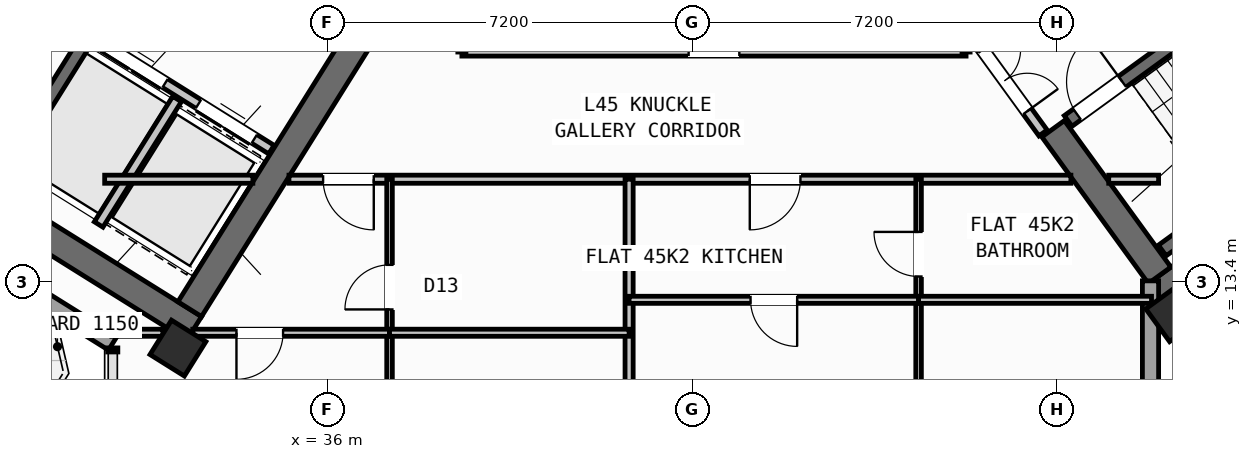
"""IFC4 building model, lengths in metres.
Left out: names, types, materials, properties, quantities, classifications, styles, units other than length and angle.
Written with IfcOpenShell. Run it as: python <this file> out.ifc"""

import sys

from ifc_helpers import new_model, si_unit, direction, frame, frame_2d, origin, origin_2d, place, context, subcontext, project, spatial, rectangle, hollow_rectangle, extrude, source, transform, mapped, element, fill, save


model = new_model("IFC4")
c1 = context("Model", 3, precision=1e-05, world=origin(), true_north=direction((0.0, 1.0)))
c2 = subcontext(c1, "Body", "Model", "MODEL_VIEW")
j1 = project(units=[si_unit("LENGTHUNIT", "METRE"), si_unit("PLANEANGLEUNIT", "RADIAN")], contexts=[c1])
p1 = place(None, origin())
s1 = spatial("IfcSite", under=j1, at=p1, CompositionType="ELEMENT")
p2 = place(p1, origin())
s2 = spatial("IfcBuilding", under=s1, at=p2, CompositionType="ELEMENT")
p3 = place(p2, frame((0.0, 0.0, 179.4)))
s3 = spatial("IfcBuildingStorey", under=s2, at=p3, CompositionType="ELEMENT", Elevation=179.4)
p4 = place(p3, frame((33.366, 12.477, 0.0), z_axis=(0.0, 0.0, 1.0), x_axis=(-0.848047359947, 0.529920442413, 0.0)))
e1 = element("IfcWall", 1, at=p4, inside=s3, PredefinedType="SHEAR", context=c2, shape_type="SweptSolid", body=[
    extrude(rectangle(XDim=13.14, YDim=0.55, at=frame_2d((6.57, 0.0))), origin(), (0.0, 0.0, 1.0), 4.55),
])
p5 = place(p3, frame((36.683, 18.304, 0.0), z_axis=(0.0, 0.0, 1.0), x_axis=(-0.529896466841, -0.848062341122, 0.0)))
e2 = element("IfcWall", 2, at=p5, inside=s3, PredefinedType="SHEAR", context=c2, shape_type="SweptSolid", body=[
    extrude(rectangle(XDim=6.425, YDim=0.55, at=frame_2d((3.212, 0.0))), origin(), (0.0, 0.0, 1.0), 4.55),
])
p6 = place(p3, frame((52.359, 13.14, 0.0), z_axis=(0.0, 0.0, 1.0), x_axis=(0.809014896919, 0.587788139183, 0.0)))
e3 = element("IfcWall", 3, at=p6, inside=s3, PredefinedType="SHEAR", context=c2, shape_type="SweptSolid", body=[
    extrude(rectangle(XDim=12.34, YDim=0.55, at=frame_2d((6.17, 0.0))), origin(), (0.0, 0.0, 1.0), 4.55),
])
p7 = place(p3, frame((52.42, 13.524, 0.0), z_axis=(0.0, 0.0, 1.0), x_axis=(-0.587802113096, 0.809004744015, 0.0)))
e4 = element("IfcWall", 4, at=p7, inside=s3, PredefinedType="SHEAR", context=c2, shape_type="SweptSolid", body=[
    extrude(rectangle(XDim=3.575, YDim=0.55, at=frame_2d((1.788, 0.0))), origin(), (0.0, 0.0, 1.0), 4.55),
])
m1 = source(origin(), c2, "Body", "SweptSolid", [
    extrude(hollow_rectangle(XDim=0.8, YDim=0.8, WallThickness=0.032, at=origin_2d()), origin(), (0.0, 0.0, 1.0), 4.8),
])
for number, where, z_axis, x_axis in (
    (5, (33.046, 12.087, 0.0), (0.0, 0.0, 1.0), (-0.848, 0.53, 0.0)),
    (6, (52.705, 12.773, 0.0), (0.0, 0.0, 1.0), (0.809, 0.588, 0.0)),
):
    element("IfcColumn", number, at=place(p3, frame(where, z_axis=z_axis, x_axis=x_axis)), inside=s3, PredefinedType="COLUMN", context=c2, shape_type="MappedRepresentation", body=[
        mapped(m1, transform((0.0, 0.0, 0.0), scale=1.0)),
    ])
p8 = place(p3, frame((31.76, 12.183, 0.0), z_axis=(0.0, 0.0, 1.0), x_axis=(-0.848047074256, 0.529920899612, 0.0)))
e7 = element("IfcWall", 7, at=p8, inside=s3, PredefinedType="STANDARD", context=c2, shape_type="SweptSolid", body=[
    extrude(rectangle(XDim=30.652, YDim=0.32, at=frame_2d((15.326, 0.0))), origin(), (0.0, 0.0, 1.0), 4.55),
])
p9 = place(p8, frame((21.52, 0.0, 0.0)))
e8 = element("IfcOpeningElement", 8, at=p9, cuts=e7, PredefinedType="OPENING", context=c2, shape_type="SweptSolid", body=[
    extrude(rectangle(XDim=1.2, YDim=2.15, at=frame_2d((0.6, 1.075))), frame((0.0, 0.17, 0.0), z_axis=(0.0, -1.0, 0.0), x_axis=(1.0, 0.0, 0.0)), (0.0, 0.0, 1.0), 0.34),
])
p10 = place(p8, frame((14.878, 0.0, 0.0)))
e9 = element("IfcOpeningElement", 9, at=p10, cuts=e7, PredefinedType="OPENING", context=c2, shape_type="SweptSolid", body=[
    extrude(rectangle(XDim=1.5, YDim=2.25, at=frame_2d((0.75, 1.125))), frame((0.0, 0.17, 0.0), z_axis=(0.0, -1.0, 0.0), x_axis=(1.0, 0.0, 0.0)), (0.0, 0.0, 1.0), 0.34),
])
p11 = place(p8, frame((1.865, 0.0, 0.75)))
e10 = element("IfcOpeningElement", 10, at=p11, cuts=e7, PredefinedType="OPENING", context=c2, shape_type="SweptSolid", body=[
    extrude(rectangle(XDim=2.4, YDim=1.6, at=frame_2d((1.2, 0.8))), frame((0.0, 0.17, 0.0), z_axis=(0.0, -1.0, 0.0), x_axis=(1.0, 0.0, 0.0)), (0.0, 0.0, 1.0), 0.34),
])
p12 = place(p8, frame((7.094, 0.0, 0.75)))
e11 = element("IfcOpeningElement", 11, at=p12, cuts=e7, PredefinedType="OPENING", context=c2, shape_type="SweptSolid", body=[
    extrude(rectangle(XDim=2.4, YDim=1.6, at=frame_2d((1.2, 0.8))), frame((0.0, 0.17, 0.0), z_axis=(0.0, -1.0, 0.0), x_axis=(1.0, 0.0, 0.0)), (0.0, 0.0, 1.0), 0.34),
])
p13 = place(p8, frame((19.404, 0.0, 0.95)))
e12 = element("IfcOpeningElement", 12, at=p13, cuts=e7, PredefinedType="OPENING", context=c2, shape_type="SweptSolid", body=[
    extrude(rectangle(XDim=1.2, YDim=1.4, at=frame_2d((0.6, 0.7))), frame((0.0, 0.17, 0.0), z_axis=(0.0, -1.0, 0.0), x_axis=(1.0, 0.0, 0.0)), (0.0, 0.0, 1.0), 0.34),
])
p14 = place(p8, frame((26.458, 0.0, 0.75)))
e13 = element("IfcOpeningElement", 13, at=p14, cuts=e7, PredefinedType="OPENING", context=c2, shape_type="SweptSolid", body=[
    extrude(rectangle(XDim=2.4, YDim=1.6, at=frame_2d((1.2, 0.8))), frame((0.0, 0.17, 0.0), z_axis=(0.0, -1.0, 0.0), x_axis=(1.0, 0.0, 0.0)), (0.0, 0.0, 1.0), 0.34),
])
p15 = place(p3, frame((52.24, 13.414, 0.0), z_axis=(0.0, 0.0, 1.0), x_axis=(0.0, -1.0, 0.0)))
e14 = element("IfcWall", 14, at=p15, inside=s3, PredefinedType="STANDARD", context=c2, shape_type="SweptSolid", body=[
    extrude(rectangle(XDim=9.948, YDim=0.32, at=frame_2d((4.974, 0.0))), origin(), (0.0, 0.0, 1.0), 4.55),
])
p16 = place(p15, frame((2.268, 0.0, 0.75)))
e15 = element("IfcOpeningElement", 15, at=p16, cuts=e14, PredefinedType="OPENING", context=c2, shape_type="SweptSolid", body=[
    extrude(rectangle(XDim=2.4, YDim=1.6, at=frame_2d((1.2, 0.8))), frame((0.0, 0.17, 0.0), z_axis=(0.0, -1.0, 0.0), x_axis=(1.0, 0.0, 0.0)), (0.0, 0.0, 1.0), 0.34),
])
p17 = place(p15, frame((7.183, 0.0, 0.85)))
e16 = element("IfcOpeningElement", 16, at=p17, cuts=e14, PredefinedType="OPENING", context=c2, shape_type="SweptSolid", body=[
    extrude(rectangle(XDim=1.8, YDim=1.5, at=frame_2d((0.9, 0.75))), frame((0.0, 0.17, 0.0), z_axis=(0.0, -1.0, 0.0), x_axis=(1.0, 0.0, 0.0)), (0.0, 0.0, 1.0), 0.34),
])
p18 = place(p3, frame((31.288, 18.256, 0.0), z_axis=(0.0, 0.0, 1.0), x_axis=(-0.529943379326, -0.848033026897, 0.0)))
e17 = element("IfcWall", 17, at=p18, inside=s3, PredefinedType="SHEAR", context=c2, shape_type="SweptSolid", body=[
    extrude(rectangle(XDim=3.16, YDim=0.26, at=frame_2d((1.58, 0.0))), origin(), (0.0, 0.0, 1.0), 4.55),
])
p19 = place(p3, frame((34.891, 16.005, 0.0), z_axis=(0.0, 0.0, 1.0), x_axis=(-0.848062873452, 0.529895614884, 0.0)))
e18 = element("IfcWall", 18, at=p19, inside=s3, PredefinedType="STANDARD", context=c2, shape_type="SweptSolid", body=[
    extrude(rectangle(XDim=4.248, YDim=0.2, at=frame_2d((2.124, 0.0))), origin(), (0.0, 0.0, 1.0), 4.54),
])
p20 = place(p19, frame((0.398, 0.0, 0.0)))
e19 = element("IfcOpeningElement", 19, at=p20, cuts=e18, PredefinedType="OPENING", context=c2, shape_type="SweptSolid", body=[
    extrude(rectangle(XDim=1.3, YDim=2.2, at=frame_2d((0.65, 1.1))), frame((0.0, 0.11, 0.0), z_axis=(0.0, -1.0, 0.0), x_axis=(1.0, 0.0, 0.0)), (0.0, 0.0, 1.0), 0.22),
])
p21 = place(p19, frame((2.473, 0.0, 0.0)))
e20 = element("IfcOpeningElement", 20, at=p21, cuts=e18, PredefinedType="OPENING", context=c2, shape_type="SweptSolid", body=[
    extrude(rectangle(XDim=1.45, YDim=2.25, at=frame_2d((0.725, 1.125))), frame((0.0, 0.11, 0.0), z_axis=(0.0, -1.0, 0.0), x_axis=(1.0, 0.0, 0.0)), (0.0, 0.0, 1.0), 0.22),
])
p22 = place(p3, frame((33.029, 17.003, 0.0), z_axis=(0.0, 0.0, 1.0), x_axis=(-0.529916267533, -0.848049968695, 0.0)))
e21 = element("IfcWall", 21, at=p22, inside=s3, PredefinedType="STANDARD", context=c2, shape_type="SweptSolid", body=[
    extrude(rectangle(XDim=2.92, YDim=0.2, at=frame_2d((1.46, 0.0))), origin(), (0.0, 0.0, 1.0), 4.54),
])
p23 = place(p3, frame((52.472, 14.013, 0.0), z_axis=(0.0, 0.0, 1.0), x_axis=(0.809028366311, 0.587769599847, 0.0)))
e22 = element("IfcWall", 22, at=p23, inside=s3, PredefinedType="SHEAR", context=c2, shape_type="SweptSolid", body=[
    extrude(rectangle(XDim=7.33, YDim=0.26, at=frame_2d((3.665, 0.0))), origin(), (0.0, 0.0, 1.0), 4.55),
])
p24 = place(p3, frame((50.615, 16.57, 0.0), z_axis=(0.0, 0.0, 1.0), x_axis=(0.809028366311, 0.587769599847, 0.0)))
e23 = element("IfcWall", 23, at=p24, inside=s3, PredefinedType="SHEAR", context=c2, shape_type="SweptSolid", body=[
    extrude(rectangle(XDim=7.33, YDim=0.26, at=frame_2d((3.665, 0.0))), origin(), (0.0, 0.0, 1.0), 4.55),
])
p25 = place(p24, frame((0.22, 0.0, 0.0)))
e24 = element("IfcOpeningElement", 24, at=p25, cuts=e23, PredefinedType="OPENING", context=c2, shape_type="SweptSolid", body=[
    extrude(rectangle(XDim=1.1, YDim=2.1, at=frame_2d((0.55, 1.05))), frame((0.0, 0.14, 0.0), z_axis=(0.0, -1.0, 0.0), x_axis=(1.0, 0.0, 0.0)), (0.0, 0.0, 1.0), 0.28),
])
p26 = place(p3, frame((31.6, 15.42, 0.0), z_axis=(0.0, 0.0, 1.0), x_axis=(1.0, 0.0, 0.0)))
e25 = element("IfcWall", 25, at=p26, inside=s3, PredefinedType="PARTITIONING", context=c2, shape_type="SweptSolid", body=[
    extrude(rectangle(XDim=2.925, YDim=0.16, at=frame_2d((1.462, 0.0))), origin(), (0.0, 0.0, 1.0), 4.54),
])
p27 = place(p3, frame((35.237, 15.42, 0.0), z_axis=(0.0, 0.0, 1.0), x_axis=(1.0, 0.0, 0.0)))
e26 = element("IfcWall", 26, at=p27, inside=s3, PredefinedType="PARTITIONING", context=c2, shape_type="SweptSolid", body=[
    extrude(rectangle(XDim=15.432, YDim=0.16, at=frame_2d((7.716, 0.0))), origin(), (0.0, 0.0, 1.0), 4.54),
])
p28 = place(p27, frame((0.674, 0.0, 0.0)))
e27 = element("IfcOpeningElement", 27, at=p28, cuts=e26, PredefinedType="OPENING", context=c2, shape_type="SweptSolid", body=[
    extrude(rectangle(XDim=1.0, YDim=2.1, at=frame_2d((0.5, 1.05))), frame((0.0, 0.09, 0.0), z_axis=(0.0, -1.0, 0.0), x_axis=(1.0, 0.0, 0.0)), (0.0, 0.0, 1.0), 0.18),
])
p29 = place(p27, frame((9.094, 0.0, 0.0)))
e28 = element("IfcOpeningElement", 28, at=p29, cuts=e26, PredefinedType="OPENING", context=c2, shape_type="SweptSolid", body=[
    extrude(rectangle(XDim=1.0, YDim=2.1, at=frame_2d((0.5, 1.05))), frame((0.0, 0.09, 0.0), z_axis=(0.0, -1.0, 0.0), x_axis=(1.0, 0.0, 0.0)), (0.0, 0.0, 1.0), 0.18),
])
p30 = place(p3, frame((51.416, 15.42, 0.0), z_axis=(0.0, 0.0, 1.0), x_axis=(1.0, 0.0, 0.0)))
e29 = element("IfcWall", 29, at=p30, inside=s3, PredefinedType="PARTITIONING", context=c2, shape_type="SweptSolid", body=[
    extrude(rectangle(XDim=0.984, YDim=0.16, at=frame_2d((0.492, 0.0))), origin(), (0.0, 0.0, 1.0), 4.54),
])
p31 = place(p3, frame((38.65, 17.93, 0.0), z_axis=(0.0, 0.0, 1.0), x_axis=(1.0, 0.0, 0.0)))
e30 = element("IfcWall", 30, at=p31, inside=s3, PredefinedType="PARTITIONING", context=c2, shape_type="SweptSolid", body=[
    extrude(rectangle(XDim=9.95, YDim=0.16, at=frame_2d((4.975, 0.0))), origin(), (0.0, 0.0, 1.0), 4.54),
])
p32 = place(p31, frame((4.475, 0.0, 0.0)))
e31 = element("IfcOpeningElement", 31, at=p32, cuts=e30, PredefinedType="OPENING", context=c2, shape_type="SweptSolid", body=[
    extrude(rectangle(XDim=1.0, YDim=2.1, at=frame_2d((0.5, 1.05))), frame((0.0, 0.09, 0.0), z_axis=(0.0, -1.0, 0.0), x_axis=(1.0, 0.0, 0.0)), (0.0, 0.0, 1.0), 0.18),
])
p33 = place(p3, frame((50.119, 16.333, 0.0), z_axis=(0.0, 0.0, 1.0), x_axis=(-0.587749856981, 0.809042709391, 0.0)))
e32 = element("IfcWall", 32, at=p33, inside=s3, PredefinedType="STANDARD", context=c2, shape_type="SweptSolid", body=[
    extrude(rectangle(XDim=2.96, YDim=0.2, at=frame_2d((1.48, 0.0))), origin(), (0.0, 0.0, 1.0), 4.54),
])
p34 = place(p33, frame((0.53, 0.0, 0.0)))
e33 = element("IfcOpeningElement", 33, at=p34, cuts=e32, PredefinedType="OPENING", context=c2, shape_type="SweptSolid", body=[
    extrude(rectangle(XDim=1.5, YDim=2.15, at=frame_2d((0.75, 1.075))), frame((0.0, 0.11, 0.0), z_axis=(0.0, -1.0, 0.0), x_axis=(1.0, 0.0, 0.0)), (0.0, 0.0, 1.0), 0.22),
])
p35 = place(p3, frame((41.95, 1.96, 0.0), z_axis=(0.0, 0.0, 1.0), x_axis=(0.0, 1.0, 0.0)))
e34 = element("IfcWall", 34, at=p35, inside=s3, PredefinedType="PARTITIONING", context=c2, shape_type="SweptSolid", body=[
    extrude(rectangle(XDim=13.46, YDim=0.16, at=frame_2d((6.73, 0.0))), origin(), (0.0, 0.0, 1.0), 4.54),
])
p36 = place(p3, frame((37.222, 1.96, 0.0), z_axis=(0.0, 0.0, 1.0), x_axis=(0.0, 1.0, 0.0)))
e35 = element("IfcWall", 35, at=p36, inside=s3, PredefinedType="PARTITIONING", context=c2, shape_type="SweptSolid", body=[
    extrude(rectangle(XDim=13.46, YDim=0.11, at=frame_2d((6.73, 0.0))), origin(), (0.0, 0.0, 1.0), 4.54),
])
p37 = place(p36, frame((5.2, 0.0, 0.0)))
e36 = element("IfcOpeningElement", 36, at=p37, cuts=e35, PredefinedType="OPENING", context=c2, shape_type="SweptSolid", body=[
    extrude(rectangle(XDim=0.92, YDim=2.08, at=frame_2d((0.46, 1.04))), frame((0.0, 0.065, 0.0), z_axis=(0.0, -1.0, 0.0), x_axis=(1.0, 0.0, 0.0)), (0.0, 0.0, 1.0), 0.13),
])
p38 = place(p36, frame((10.89, 0.0, 0.0)))
e37 = element("IfcOpeningElement", 37, at=p38, cuts=e35, PredefinedType="OPENING", context=c2, shape_type="SweptSolid", body=[
    extrude(rectangle(XDim=0.88, YDim=2.08, at=frame_2d((0.44, 1.04))), frame((0.0, 0.065, 0.0), z_axis=(0.0, -1.0, 0.0), x_axis=(1.0, 0.0, 0.0)), (0.0, 0.0, 1.0), 0.13),
])
p39 = place(p3, frame((31.74, 12.39, 0.0), z_axis=(0.0, 0.0, 1.0), x_axis=(1.0, 0.0, 0.0)))
e38 = element("IfcWall", 38, at=p39, inside=s3, PredefinedType="PLUMBINGWALL", context=c2, shape_type="SweptSolid", body=[
    extrude(rectangle(XDim=1.01, YDim=0.14, at=frame_2d((0.505, 0.0))), origin(), (0.0, 0.0, 1.0), 4.54),
])
p40 = place(p3, frame((33.339, 12.39, 0.0), z_axis=(0.0, 0.0, 1.0), x_axis=(1.0, 0.0, 0.0)))
e39 = element("IfcWall", 39, at=p40, inside=s3, PredefinedType="PLUMBINGWALL", context=c2, shape_type="SweptSolid", body=[
    extrude(rectangle(XDim=3.883, YDim=0.14, at=frame_2d((1.942, 0.0))), origin(), (0.0, 0.0, 1.0), 3.725),
])
p41 = place(p40, frame((0.863, 0.0, 0.0)))
e40 = element("IfcOpeningElement", 40, at=p41, cuts=e39, PredefinedType="OPENING", context=c2, shape_type="SweptSolid", body=[
    extrude(rectangle(XDim=0.92, YDim=2.08, at=frame_2d((0.46, 1.04))), frame((0.0, 0.08, 0.0), z_axis=(0.0, -1.0, 0.0), x_axis=(1.0, 0.0, 0.0)), (0.0, 0.0, 1.0), 0.16),
])
p42 = place(p3, frame((37.222, 12.39, 0.0), z_axis=(0.0, 0.0, 1.0), x_axis=(1.0, 0.0, 0.0)))
e41 = element("IfcWall", 41, at=p42, inside=s3, PredefinedType="PLUMBINGWALL", context=c2, shape_type="SweptSolid", body=[
    extrude(rectangle(XDim=4.728, YDim=0.14, at=frame_2d((2.364, 0.0))), origin(), (0.0, 0.0, 1.0), 3.725),
])
p43 = place(p3, frame((47.663, 1.96, 0.0), z_axis=(0.0, 0.0, 1.0), x_axis=(0.0, 1.0, 0.0)))
e42 = element("IfcWall", 42, at=p43, inside=s3, PredefinedType="PARTITIONING", context=c2, shape_type="SweptSolid", body=[
    extrude(rectangle(XDim=13.46, YDim=0.11, at=frame_2d((6.73, 0.0))), origin(), (0.0, 0.0, 1.0), 4.54),
])
p44 = place(p43, frame((6.3, 0.0, 0.0)))
e43 = element("IfcOpeningElement", 43, at=p44, cuts=e42, PredefinedType="OPENING", context=c2, shape_type="SweptSolid", body=[
    extrude(rectangle(XDim=0.92, YDim=2.08, at=frame_2d((0.46, 1.04))), frame((0.0, 0.065, 0.0), z_axis=(0.0, -1.0, 0.0), x_axis=(1.0, 0.0, 0.0)), (0.0, 0.0, 1.0), 0.13),
])
p45 = place(p43, frame((11.54, 0.0, 0.0)))
e44 = element("IfcOpeningElement", 44, at=p45, cuts=e42, PredefinedType="OPENING", context=c2, shape_type="SweptSolid", body=[
    extrude(rectangle(XDim=0.88, YDim=2.08, at=frame_2d((0.44, 1.04))), frame((0.0, 0.065, 0.0), z_axis=(0.0, -1.0, 0.0), x_axis=(1.0, 0.0, 0.0)), (0.0, 0.0, 1.0), 0.13),
])
p46 = place(p3, frame((41.95, 13.04, 0.0), z_axis=(0.0, 0.0, 1.0), x_axis=(1.0, 0.0, 0.0)))
e45 = element("IfcWall", 45, at=p46, inside=s3, PredefinedType="PLUMBINGWALL", context=c2, shape_type="SweptSolid", body=[
    extrude(rectangle(XDim=5.713, YDim=0.14, at=frame_2d((2.856, 0.0))), origin(), (0.0, 0.0, 1.0), 4.54),
])
p47 = place(p46, frame((2.396, 0.0, 0.0)))
e46 = element("IfcOpeningElement", 46, at=p47, cuts=e45, PredefinedType="OPENING", context=c2, shape_type="SweptSolid", body=[
    extrude(rectangle(XDim=0.92, YDim=2.08, at=frame_2d((0.46, 1.04))), frame((0.0, 0.08, 0.0), z_axis=(0.0, -1.0, 0.0), x_axis=(1.0, 0.0, 0.0)), (0.0, 0.0, 1.0), 0.16),
])
p48 = place(p3, frame((47.663, 13.04, 0.0), z_axis=(0.0, 0.0, 1.0), x_axis=(1.0, 0.0, 0.0)))
e47 = element("IfcWall", 47, at=p48, inside=s3, PredefinedType="PLUMBINGWALL", context=c2, shape_type="SweptSolid", body=[
    extrude(rectangle(XDim=4.597, YDim=0.14, at=frame_2d((2.298, 0.0))), origin(), (0.0, 0.0, 1.0), 3.725),
])
m2 = source(origin(), c2, "Body", "SweptSolid", [
    extrude(rectangle(XDim=1.3, YDim=2.2, at=frame_2d((0.65, 1.1))), frame((0.0, 0.025, 0.0), z_axis=(0.0, -1.0, 0.0), x_axis=(1.0, 0.0, 0.0)), (0.0, 0.0, 1.0), 0.05),
])
p49 = place(p20, origin())
e48 = element("IfcDoor", 48, at=p49, inside=s3, OperationType="DOUBLE_DOOR_SLIDING", PredefinedType="DOOR", context=c2, shape_type="MappedRepresentation", body=[
    mapped(m2, transform((0.0, 0.0, 0.0), scale=1.0)),
])
fill(e19, e48)
m3 = source(origin(), c2, "Body", "SweptSolid", [
    extrude(rectangle(XDim=1.45, YDim=2.25, at=frame_2d((0.725, 1.125))), frame((0.0, 0.025, 0.0), z_axis=(0.0, -1.0, 0.0), x_axis=(1.0, 0.0, 0.0)), (0.0, 0.0, 1.0), 0.05),
])
p50 = place(p21, origin())
e49 = element("IfcDoor", 49, at=p50, inside=s3, OperationType="DOUBLE_DOOR_SLIDING", PredefinedType="DOOR", context=c2, shape_type="MappedRepresentation", body=[
    mapped(m3, transform((0.0, 0.0, 0.0), scale=1.0)),
])
fill(e20, e49)
m4 = source(origin(), c2, "Body", "SweptSolid", [
    extrude(rectangle(XDim=1.1, YDim=2.1, at=frame_2d((0.55, 1.05))), frame((0.0, 0.025, 0.0), z_axis=(0.0, -1.0, 0.0), x_axis=(1.0, 0.0, 0.0)), (0.0, 0.0, 1.0), 0.05),
])
p51 = place(p25, origin())
e50 = element("IfcDoor", 50, at=p51, inside=s3, OperationType="SINGLE_SWING_RIGHT", PredefinedType="DOOR", context=c2, shape_type="MappedRepresentation", body=[
    mapped(m4, transform((0.0, 0.0, 0.0), scale=1.0)),
])
fill(e24, e50)
m5 = source(origin(), c2, "Body", "SweptSolid", [
    extrude(rectangle(XDim=1.0, YDim=2.1, at=frame_2d((0.5, 1.05))), frame((0.0, 0.025, 0.0), z_axis=(0.0, -1.0, 0.0), x_axis=(1.0, 0.0, 0.0)), (0.0, 0.0, 1.0), 0.05),
])
p52 = place(p32, origin())
e51 = element("IfcDoor", 51, at=p52, inside=s3, OperationType="SINGLE_SWING_RIGHT", PredefinedType="DOOR", context=c2, shape_type="MappedRepresentation", body=[
    mapped(m5, transform((0.0, 0.0, 0.0), scale=1.0)),
])
fill(e31, e51)
m6 = source(origin(), c2, "Body", "SweptSolid", [
    extrude(rectangle(XDim=1.5, YDim=2.15, at=frame_2d((0.75, 1.075))), frame((0.0, 0.025, 0.0), z_axis=(0.0, -1.0, 0.0), x_axis=(1.0, 0.0, 0.0)), (0.0, 0.0, 1.0), 0.05),
])
p53 = place(p34, frame((1.5, 0.0, 0.0), z_axis=(0.0, 0.0, 1.0), x_axis=(-1.0, 0.0, 0.0)))
e52 = element("IfcDoor", 52, at=p53, inside=s3, OperationType="DOUBLE_DOOR_SINGLE_SWING", PredefinedType="DOOR", context=c2, shape_type="MappedRepresentation", body=[
    mapped(m6, transform((0.0, 0.0, 0.0), scale=1.0)),
])
fill(e33, e52)
p54 = place(p28, frame((1.0, 0.0, 0.0), z_axis=(0.0, 0.0, 1.0), x_axis=(-1.0, 0.0, 0.0)))
e53 = element("IfcDoor", 53, at=p54, inside=s3, OperationType="SINGLE_SWING_LEFT", PredefinedType="DOOR", context=c2, shape_type="MappedRepresentation", body=[
    mapped(m5, transform((0.0, 0.0, 0.0), scale=1.0)),
])
fill(e27, e53)
m7 = source(origin(), c2, "Body", "SweptSolid", [
    extrude(rectangle(XDim=0.92, YDim=2.08, at=frame_2d((0.46, 1.04))), frame((0.0, 0.025, 0.0), z_axis=(0.0, -1.0, 0.0), x_axis=(1.0, 0.0, 0.0)), (0.0, 0.0, 1.0), 0.05),
])
p55 = place(p41, frame((0.92, 0.0, 0.0), z_axis=(0.0, 0.0, 1.0), x_axis=(-1.0, 0.0, 0.0)))
e54 = element("IfcDoor", 54, at=p55, inside=s3, OperationType="SINGLE_SWING_RIGHT", PredefinedType="DOOR", context=c2, shape_type="MappedRepresentation", body=[
    mapped(m7, transform((0.0, 0.0, 0.0), scale=1.0)),
])
fill(e40, e54)
m8 = source(origin(), c2, "Body", "SweptSolid", [
    extrude(rectangle(XDim=0.88, YDim=2.08, at=frame_2d((0.44, 1.04))), frame((0.0, 0.025, 0.0), z_axis=(0.0, -1.0, 0.0), x_axis=(1.0, 0.0, 0.0)), (0.0, 0.0, 1.0), 0.05),
])
p56 = place(p38, origin())
e55 = element("IfcDoor", 55, at=p56, inside=s3, OperationType="SINGLE_SWING_LEFT", PredefinedType="DOOR", context=c2, shape_type="MappedRepresentation", body=[
    mapped(m8, transform((0.0, 0.0, 0.0), scale=1.0)),
])
fill(e37, e55)
p57 = place(p29, frame((1.0, 0.0, 0.0), z_axis=(0.0, 0.0, 1.0), x_axis=(-1.0, 0.0, 0.0)))
e56 = element("IfcDoor", 56, at=p57, inside=s3, OperationType="SINGLE_SWING_RIGHT", PredefinedType="DOOR", context=c2, shape_type="MappedRepresentation", body=[
    mapped(m5, transform((0.0, 0.0, 0.0), scale=1.0)),
])
fill(e28, e56)
p58 = place(p47, frame((0.92, 0.0, 0.0), z_axis=(0.0, 0.0, 1.0), x_axis=(-1.0, 0.0, 0.0)))
e57 = element("IfcDoor", 57, at=p58, inside=s3, OperationType="SINGLE_SWING_LEFT", PredefinedType="DOOR", context=c2, shape_type="MappedRepresentation", body=[
    mapped(m7, transform((0.0, 0.0, 0.0), scale=1.0)),
])
fill(e46, e57)
p59 = place(p45, origin())
e58 = element("IfcDoor", 58, at=p59, inside=s3, OperationType="SINGLE_SWING_RIGHT", PredefinedType="DOOR", context=c2, shape_type="MappedRepresentation", body=[
    mapped(m8, transform((0.0, 0.0, 0.0), scale=1.0)),
])
fill(e44, e58)
save(model, sys.argv[1])
